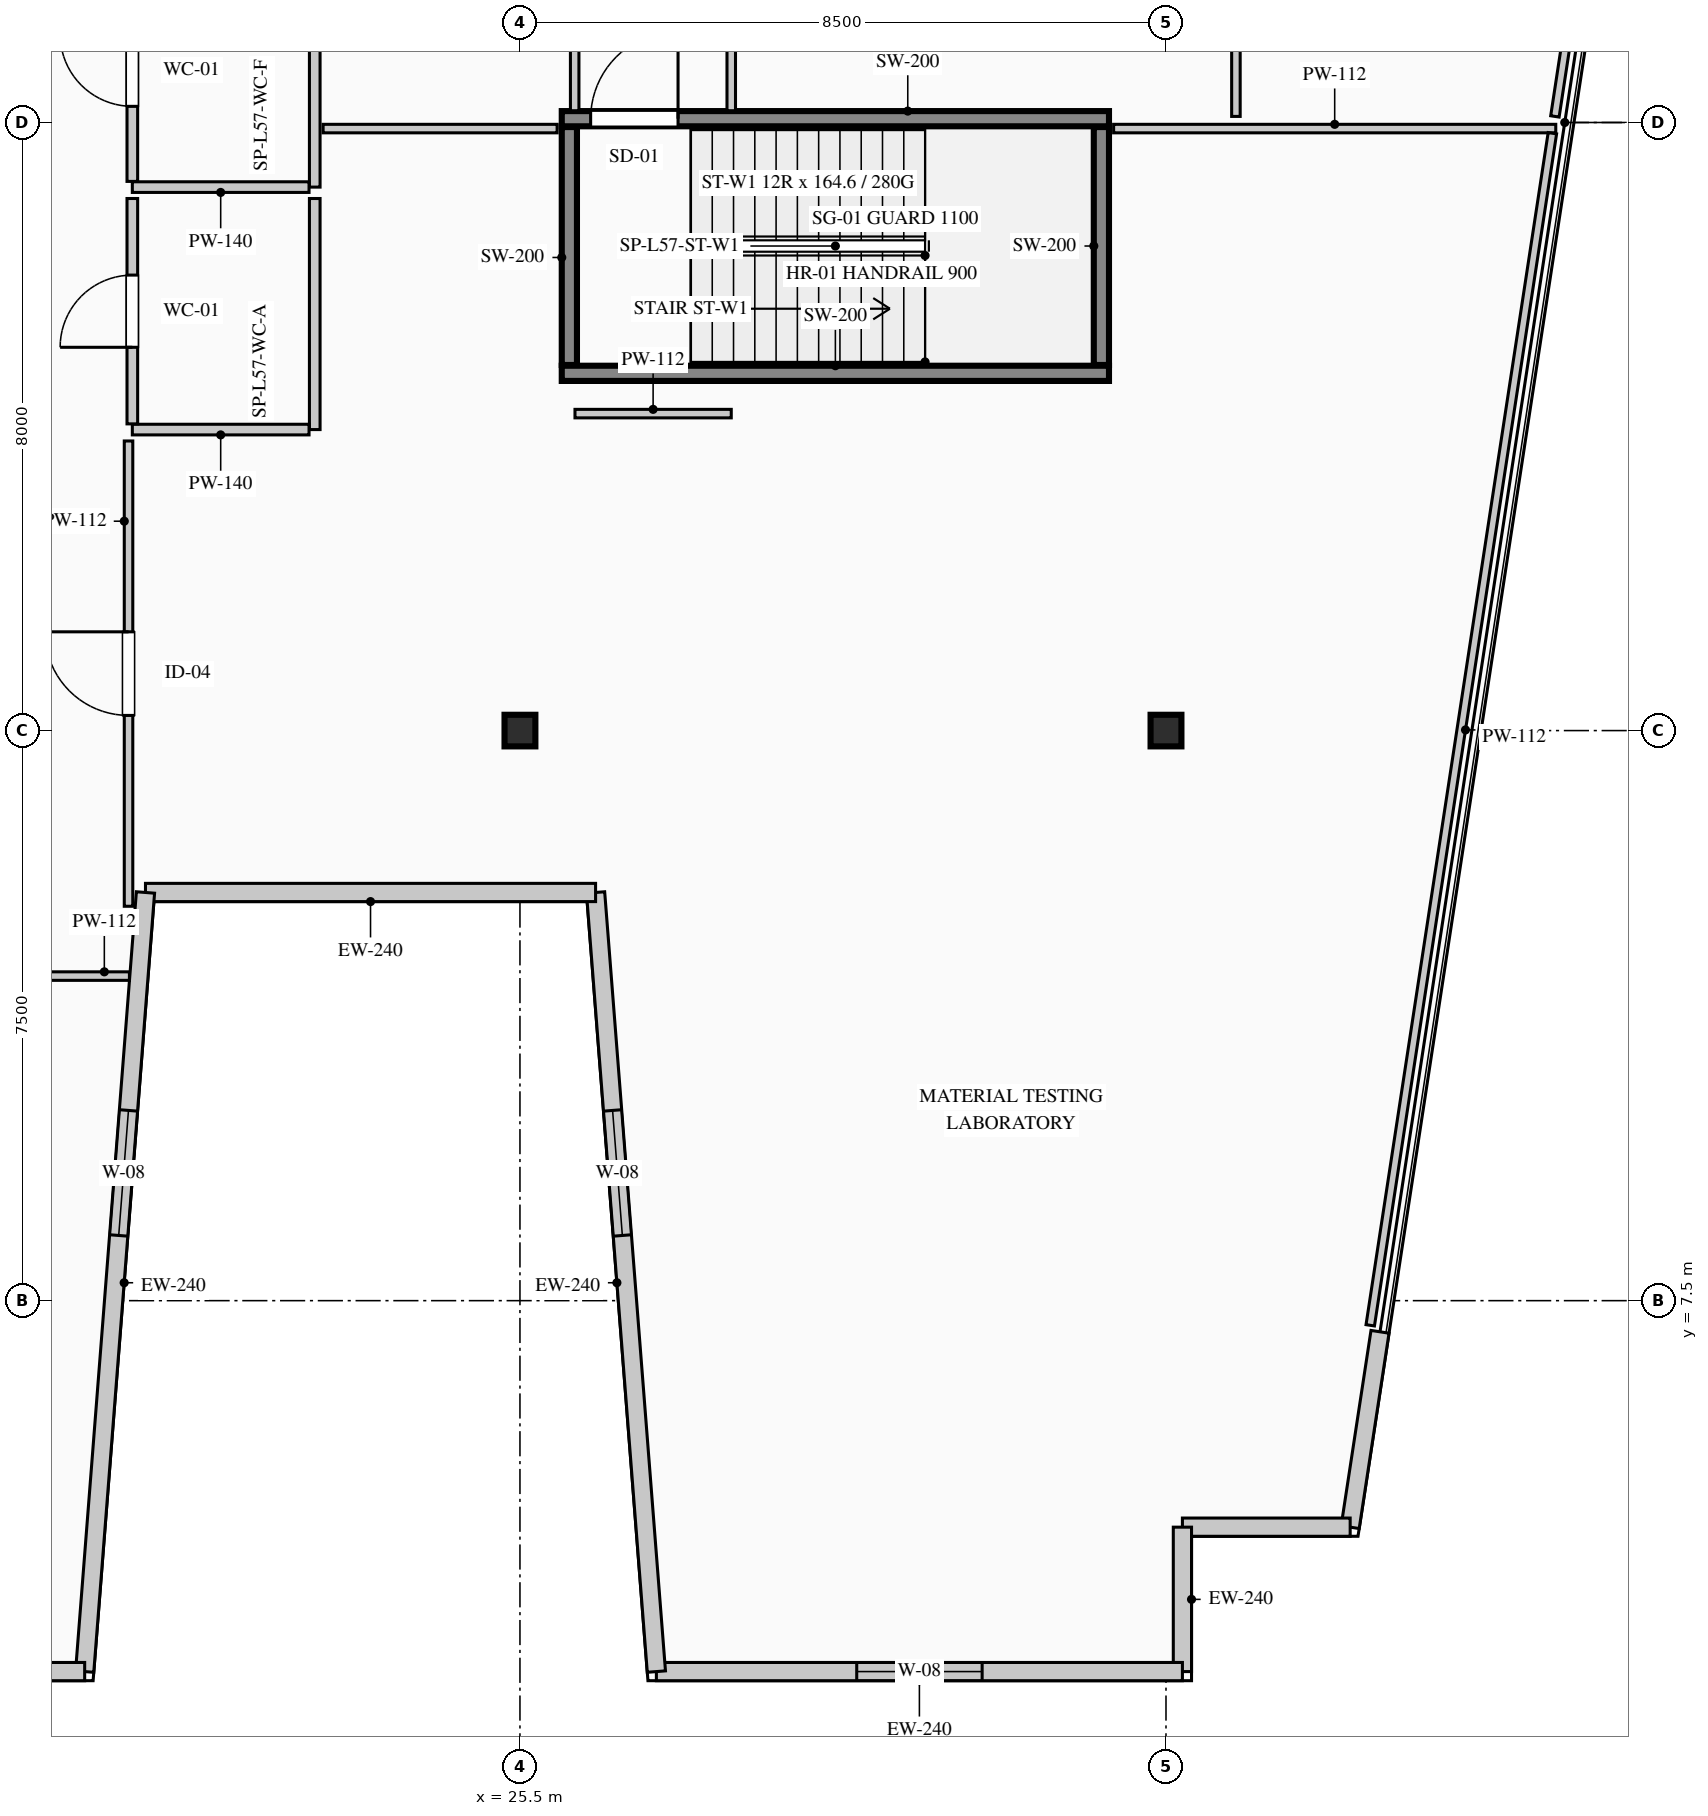
"""IFC4 building model, lengths in metres.
Left out: names, types, materials, properties, quantities, classifications, styles, units other than length and angle.
Written with IfcOpenShell. Run it as: python <this file> out.ifc"""

import sys

from ifc_helpers import new_model, si_unit, direction, frame, frame_2d, origin, origin_2d, place, context, subcontext, project, spatial, rectangle, i_section, extrude, element, fill, save


model = new_model("IFC4")
c1 = context("Model", 3, precision=1e-05, world=origin(), true_north=direction((0.0, 1.0)))
c2 = subcontext(c1, "Body", "Model", "MODEL_VIEW")
j1 = project(units=[si_unit("LENGTHUNIT", "METRE"), si_unit("PLANEANGLEUNIT", "RADIAN")], contexts=[c1])
p1 = place(None, origin())
s1 = spatial("IfcSite", under=j1, at=p1, CompositionType="ELEMENT")
p2 = place(p1, origin())
s2 = spatial("IfcBuilding", under=s1, at=p2, CompositionType="ELEMENT")
p3 = place(p2, frame((0.0, 0.0, 239.05)))
s3 = spatial("IfcBuildingStorey", under=s2, at=p3, CompositionType="ELEMENT", Elevation=239.05)
p4 = place(p3, frame((26.05, 19.7, 0.0), z_axis=(0.0, 0.0, 1.0), x_axis=(1.0, 0.0, 0.0)))
e1 = element("IfcWall", 1, at=p4, inside=s3, PredefinedType="SHEAR", context=c2, shape_type="SweptSolid", body=[
    extrude(rectangle(XDim=7.2, YDim=0.2, at=frame_2d((3.6, 0.0))), origin(), (0.0, 0.0, 1.0), 3.95),
])
p5 = place(p3, frame((26.05, 23.05, 0.0), z_axis=(0.0, 0.0, 1.0), x_axis=(1.0, 0.0, 0.0)))
e2 = element("IfcWall", 2, at=p5, inside=s3, PredefinedType="SHEAR", context=c2, shape_type="SweptSolid", body=[
    extrude(rectangle(XDim=7.2, YDim=0.2, at=frame_2d((3.6, 0.0))), origin(), (0.0, 0.0, 1.0), 3.95),
])
p6 = place(p5, frame((0.38, 0.0, 0.0)))
e3 = element("IfcOpeningElement", 3, at=p6, cuts=e2, PredefinedType="OPENING", context=c2, shape_type="SweptSolid", body=[
    extrude(rectangle(XDim=1.15, YDim=2.2, at=frame_2d((0.575, 1.1))), frame((0.0, 0.11, 0.0), z_axis=(0.0, -1.0, 0.0), x_axis=(1.0, 0.0, 0.0)), (0.0, 0.0, 1.0), 0.22),
])
for number, where, z_axis, x_axis in (
    (4, (26.15, 19.81, 0.0), (0.0, 0.0, 1.0), (0.0, 1.0, 0.0)),
    (5, (33.15, 19.81, 0.0), (0.0, 0.0, 1.0), (0.0, 1.0, 0.0)),
):
    element("IfcWall", number, at=place(p3, frame(where, z_axis=z_axis, x_axis=x_axis)), inside=s3, PredefinedType="SHEAR", context=c2, shape_type="SweptSolid", body=[
        extrude(rectangle(XDim=3.13, YDim=0.2, at=frame_2d((1.565, 0.0))), origin(), (0.0, 0.0, 1.0), 3.95),
    ])
for number, where, z_axis, x_axis in (
    (6, (25.5, 15.0, 0.0), (0.0, 0.0, 1.0), (1.0, 0.0, 0.0)),
    (7, (34.0, 15.0, 0.0), (0.0, 0.0, 1.0), (1.0, 0.0, 0.0)),
):
    element("IfcColumn", number, at=place(p3, frame(where, z_axis=z_axis, x_axis=x_axis)), inside=s3, PredefinedType="COLUMN", context=c2, shape_type="SweptSolid", body=[
        extrude(i_section(OverallWidth=0.406, OverallDepth=0.416, WebThickness=0.03, FlangeThickness=0.048, FilletRadius=0.015, at=origin_2d()), origin(), (0.0, 0.0, 1.0), 3.95),
    ])
p7 = place(p3, frame((36.816, 7.09, 0.0), z_axis=(0.0, 0.0, 1.0), x_axis=(-0.151090396132, -0.988519950328, 0.0)))
e8 = element("IfcWall", 8, at=p7, inside=s3, PredefinedType="STANDARD", context=c2, shape_type="SweptSolid", body=[
    extrude(rectangle(XDim=2.6, YDim=0.24, at=frame_2d((1.3, 0.0))), origin(), (0.0, 0.0, 1.0), 3.7),
])
p8 = place(p3, frame((36.423, 4.52, 0.0), z_axis=(0.0, 0.0, 1.0), x_axis=(-1.0, 0.0, 0.0)))
e9 = element("IfcWall", 9, at=p8, inside=s3, PredefinedType="STANDARD", context=c2, shape_type="SweptSolid", body=[
    extrude(rectangle(XDim=2.207, YDim=0.24, at=frame_2d((1.104, 0.0))), origin(), (0.0, 0.0, 1.0), 3.7),
])
p9 = place(p3, frame((34.216, 4.52, 0.0), z_axis=(0.0, 0.0, 1.0), x_axis=(0.0, -1.0, 0.0)))
e10 = element("IfcWall", 10, at=p9, inside=s3, PredefinedType="STANDARD", context=c2, shape_type="SweptSolid", body=[
    extrude(rectangle(XDim=1.9, YDim=0.24, at=frame_2d((0.95, 0.0))), origin(), (0.0, 0.0, 1.0), 3.7),
])
p10 = place(p3, frame((34.216, 2.62, 0.0), z_axis=(0.0, 0.0, 1.0), x_axis=(-1.0, 0.0, 0.0)))
e11 = element("IfcWall", 11, at=p10, inside=s3, PredefinedType="STANDARD", context=c2, shape_type="SweptSolid", body=[
    extrude(rectangle(XDim=6.921, YDim=0.24, at=frame_2d((3.46, 0.0))), origin(), (0.0, 0.0, 1.0), 3.7),
])
p11 = place(p10, frame((2.635, 0.0, 0.9)))
e12 = element("IfcOpeningElement", 12, at=p11, cuts=e11, PredefinedType="OPENING", context=c2, shape_type="SweptSolid", body=[
    extrude(rectangle(XDim=1.65, YDim=1.95, at=frame_2d((0.825, 0.975))), frame((0.0, 0.13, 0.0), z_axis=(0.0, -1.0, 0.0), x_axis=(1.0, 0.0, 0.0)), (0.0, 0.0, 1.0), 0.26),
])
p12 = place(p3, frame((27.295, 2.62, 0.0), z_axis=(0.0, 0.0, 1.0), x_axis=(-0.077793257511, 0.996969512616, 0.0)))
e13 = element("IfcWall", 13, at=p12, inside=s3, PredefinedType="STANDARD", context=c2, shape_type="SweptSolid", body=[
    extrude(rectangle(XDim=10.281, YDim=0.24, at=frame_2d((5.141, 0.0))), origin(), (0.0, 0.0, 1.0), 3.7),
])
p13 = place(p12, frame((5.755, 0.0, 0.9)))
e14 = element("IfcOpeningElement", 14, at=p13, cuts=e13, PredefinedType="OPENING", context=c2, shape_type="SweptSolid", body=[
    extrude(rectangle(XDim=1.65, YDim=1.95, at=frame_2d((0.825, 0.975))), frame((0.0, 0.13, 0.0), z_axis=(0.0, -1.0, 0.0), x_axis=(1.0, 0.0, 0.0)), (0.0, 0.0, 1.0), 0.26),
])
p14 = place(p3, frame((26.495, 12.87, 0.0), z_axis=(0.0, 0.0, 1.0), x_axis=(-1.0, 0.0, 0.0)))
e15 = element("IfcWall", 15, at=p14, inside=s3, PredefinedType="STANDARD", context=c2, shape_type="SweptSolid", body=[
    extrude(rectangle(XDim=5.922, YDim=0.24, at=frame_2d((2.961, 0.0))), origin(), (0.0, 0.0, 1.0), 3.7),
])
p15 = place(p3, frame((20.573, 12.87, 0.0), z_axis=(0.0, 0.0, 1.0), x_axis=(-0.077816860153, -0.996967670627, 0.0)))
e16 = element("IfcWall", 16, at=p15, inside=s3, PredefinedType="STANDARD", context=c2, shape_type="SweptSolid", body=[
    extrude(rectangle(XDim=10.281, YDim=0.24, at=frame_2d((5.141, 0.0))), origin(), (0.0, 0.0, 1.0), 3.7),
])
p16 = place(p15, frame((2.876, 0.0, 0.9)))
e17 = element("IfcOpeningElement", 17, at=p16, cuts=e16, PredefinedType="OPENING", context=c2, shape_type="SweptSolid", body=[
    extrude(rectangle(XDim=1.65, YDim=1.95, at=frame_2d((0.825, 0.975))), frame((0.0, 0.13, 0.0), z_axis=(0.0, -1.0, 0.0), x_axis=(1.0, 0.0, 0.0)), (0.0, 0.0, 1.0), 0.26),
])
p17 = place(p3, frame((19.773, 2.62, 0.0), z_axis=(0.0, 0.0, 1.0), x_axis=(-1.0, 0.0, 0.0)))
e18 = element("IfcWall", 18, at=p17, inside=s3, PredefinedType="STANDARD", context=c2, shape_type="SweptSolid", body=[
    extrude(rectangle(XDim=10.717, YDim=0.24, at=frame_2d((5.358, 0.0))), origin(), (0.0, 0.0, 1.0), 3.7),
])
p18 = place(p17, frame((4.659, 0.0, 0.0)))
e19 = element("IfcOpeningElement", 19, at=p18, cuts=e18, PredefinedType="OPENING", context=c2, shape_type="SweptSolid", body=[
    extrude(rectangle(XDim=1.4, YDim=2.2, at=frame_2d((0.7, 1.1))), frame((0.0, 0.13, 0.0), z_axis=(0.0, -1.0, 0.0), x_axis=(1.0, 0.0, 0.0)), (0.0, 0.0, 1.0), 0.26),
])
p19 = place(p3, frame((22.8, 25.15, 0.0), z_axis=(0.0, 0.0, 1.0), x_axis=(0.0, -1.0, 0.0)))
e20 = element("IfcWall", 20, at=p19, inside=s3, PredefinedType="PARTITIONING", context=c2, shape_type="SweptSolid", body=[
    extrude(rectangle(XDim=3.0, YDim=0.14, at=frame_2d((1.5, 0.0))), origin(), (0.0, 0.0, 1.0), 3.325),
])
p20 = place(p3, frame((22.725, 22.15, 0.0), z_axis=(0.0, 0.0, 1.0), x_axis=(-1.0, 0.0, 0.0)))
e21 = element("IfcWall", 21, at=p20, inside=s3, PredefinedType="PARTITIONING", context=c2, shape_type="SweptSolid", body=[
    extrude(rectangle(XDim=2.325, YDim=0.14, at=frame_2d((1.163, 0.0))), origin(), (0.0, 0.0, 1.0), 3.7),
])
p21 = place(p3, frame((20.4, 22.225, 0.0), z_axis=(0.0, 0.0, 1.0), x_axis=(0.0, 1.0, 0.0)))
e22 = element("IfcWall", 22, at=p21, inside=s3, PredefinedType="PARTITIONING", context=c2, shape_type="SweptSolid", body=[
    extrude(rectangle(XDim=2.925, YDim=0.14, at=frame_2d((1.462, 0.0))), origin(), (0.0, 0.0, 1.0), 3.7),
])
p22 = place(p21, frame((0.988, 0.0, 0.0)))
e23 = element("IfcOpeningElement", 23, at=p22, cuts=e22, PredefinedType="OPENING", context=c2, shape_type="SweptSolid", body=[
    extrude(rectangle(XDim=0.95, YDim=2.15, at=frame_2d((0.475, 1.075))), frame((0.0, 0.08, 0.0), z_axis=(0.0, -1.0, 0.0), x_axis=(1.0, 0.0, 0.0)), (0.0, 0.0, 1.0), 0.16),
])
p23 = place(p3, frame((22.8, 22.0, 0.0), z_axis=(0.0, 0.0, 1.0), x_axis=(0.0, -1.0, 0.0)))
e24 = element("IfcWall", 24, at=p23, inside=s3, PredefinedType="PARTITIONING", context=c2, shape_type="SweptSolid", body=[
    extrude(rectangle(XDim=3.04, YDim=0.14, at=frame_2d((1.52, 0.0))), origin(), (0.0, 0.0, 1.0), 3.325),
])
p24 = place(p3, frame((22.725, 18.96, 0.0), z_axis=(0.0, 0.0, 1.0), x_axis=(-1.0, 0.0, 0.0)))
e25 = element("IfcWall", 25, at=p24, inside=s3, PredefinedType="PARTITIONING", context=c2, shape_type="SweptSolid", body=[
    extrude(rectangle(XDim=2.325, YDim=0.14, at=frame_2d((1.163, 0.0))), origin(), (0.0, 0.0, 1.0), 3.7),
])
p25 = place(p3, frame((20.4, 19.035, 0.0), z_axis=(0.0, 0.0, 1.0), x_axis=(0.0, 1.0, 0.0)))
e26 = element("IfcWall", 26, at=p25, inside=s3, PredefinedType="PARTITIONING", context=c2, shape_type="SweptSolid", body=[
    extrude(rectangle(XDim=2.965, YDim=0.14, at=frame_2d((1.482, 0.0))), origin(), (0.0, 0.0, 1.0), 3.7),
])
p26 = place(p25, frame((1.008, 0.0, 0.0)))
e27 = element("IfcOpeningElement", 27, at=p26, cuts=e26, PredefinedType="OPENING", context=c2, shape_type="SweptSolid", body=[
    extrude(rectangle(XDim=0.95, YDim=2.15, at=frame_2d((0.475, 1.075))), frame((0.0, 0.08, 0.0), z_axis=(0.0, -1.0, 0.0), x_axis=(1.0, 0.0, 0.0)), (0.0, 0.0, 1.0), 0.16),
])
p27 = place(p3, frame((17.141, 11.77, 0.0), z_axis=(0.0, 0.0, 1.0), x_axis=(1.0, 0.0, 0.0)))
e28 = element("IfcWall", 28, at=p27, inside=s3, PredefinedType="PARTITIONING", context=c2, shape_type="SweptSolid", body=[
    extrude(rectangle(XDim=3.221, YDim=0.112, at=frame_2d((1.61, 0.0))), origin(), (0.0, 0.0, 1.0), 3.7),
])
p28 = place(p27, frame((1.06, 0.0, 0.0)))
e29 = element("IfcOpeningElement", 29, at=p28, cuts=e28, PredefinedType="OPENING", context=c2, shape_type="SweptSolid", body=[
    extrude(rectangle(XDim=1.1, YDim=2.2, at=frame_2d((0.55, 1.1))), frame((0.0, 0.066, 0.0), z_axis=(0.0, -1.0, 0.0), x_axis=(1.0, 0.0, 0.0)), (0.0, 0.0, 1.0), 0.132),
])
p29 = place(p3, frame((33.311, 22.92, 0.0), z_axis=(0.0, 0.0, 1.0), x_axis=(1.0, 0.0, 0.0)))
e30 = element("IfcWall", 30, at=p29, inside=s3, PredefinedType="PARTITIONING", context=c2, shape_type="SweptSolid", body=[
    extrude(rectangle(XDim=5.817, YDim=0.112, at=frame_2d((2.909, 0.0))), origin(), (0.0, 0.0, 1.0), 3.7),
])
p30 = place(p3, frame((39.084, 22.859, 0.0), z_axis=(0.0, 0.0, 1.0), x_axis=(-0.151051087355, -0.988525957681, 0.0)))
e31 = element("IfcWall", 31, at=p30, inside=s3, PredefinedType="PARTITIONING", context=c2, shape_type="SweptSolid", body=[
    extrude(rectangle(XDim=15.865, YDim=0.112, at=frame_2d((7.933, 0.0))), origin(), (0.0, 0.0, 1.0), 3.7),
])
p31 = place(p3, frame((20.35, 12.689, 0.0), z_axis=(0.0, 0.0, 1.0), x_axis=(0.0, 1.0, 0.0)))
e32 = element("IfcWall", 32, at=p31, inside=s3, PredefinedType="PARTITIONING", context=c2, shape_type="SweptSolid", body=[
    extrude(rectangle(XDim=6.121, YDim=0.112, at=frame_2d((3.061, 0.0))), origin(), (0.0, 0.0, 1.0), 3.7),
])
p32 = place(p31, frame((2.511, 0.0, 0.0)))
e33 = element("IfcOpeningElement", 33, at=p32, cuts=e32, PredefinedType="OPENING", context=c2, shape_type="SweptSolid", body=[
    extrude(rectangle(XDim=1.1, YDim=2.2, at=frame_2d((0.55, 1.1))), frame((0.0, 0.066, 0.0), z_axis=(0.0, -1.0, 0.0), x_axis=(1.0, 0.0, 0.0)), (0.0, 0.0, 1.0), 0.132),
])
p33 = place(p3, frame((22.91, 22.92, 0.0), z_axis=(0.0, 0.0, 1.0), x_axis=(1.0, 0.0, 0.0)))
e34 = element("IfcWall", 34, at=p33, inside=s3, PredefinedType="PARTITIONING", context=c2, shape_type="SweptSolid", body=[
    extrude(rectangle(XDim=3.079, YDim=0.112, at=frame_2d((1.54, 0.0))), origin(), (0.0, 0.0, 1.0), 3.7),
])
p34 = place(p3, frame((26.224, 19.17, 0.0), z_axis=(0.0, 0.0, 1.0), x_axis=(1.0, 0.0, 0.0)))
e35 = element("IfcWall", 35, at=p34, inside=s3, PredefinedType="PARTITIONING", context=c2, shape_type="SweptSolid", body=[
    extrude(rectangle(XDim=2.056, YDim=0.112, at=frame_2d((1.028, 0.0))), origin(), (0.0, 0.0, 1.0), 3.7),
])
p35 = place(p3, frame((26.22, 28.959, 0.0), z_axis=(0.0, 0.0, 1.0), x_axis=(0.0, -1.0, 0.0)))
e36 = element("IfcWall", 36, at=p35, inside=s3, PredefinedType="PARTITIONING", context=c2, shape_type="SweptSolid", body=[
    extrude(rectangle(XDim=5.804, YDim=0.112, at=frame_2d((2.902, 0.0))), origin(), (0.0, 0.0, 1.0), 3.7),
])
p36 = place(p35, frame((2.352, 0.0, 0.0)))
e37 = element("IfcOpeningElement", 37, at=p36, cuts=e36, PredefinedType="OPENING", context=c2, shape_type="SweptSolid", body=[
    extrude(rectangle(XDim=1.1, YDim=2.2, at=frame_2d((0.55, 1.1))), frame((0.0, 0.066, 0.0), z_axis=(0.0, -1.0, 0.0), x_axis=(1.0, 0.0, 0.0)), (0.0, 0.0, 1.0), 0.132),
])
p37 = place(p3, frame((28.28, 23.155, 0.0), z_axis=(0.0, 0.0, 1.0), x_axis=(0.0, 1.0, 0.0)))
e38 = element("IfcWall", 38, at=p37, inside=s3, PredefinedType="PARTITIONING", context=c2, shape_type="SweptSolid", body=[
    extrude(rectangle(XDim=5.865, YDim=0.112, at=frame_2d((2.933, 0.0))), origin(), (0.0, 0.0, 1.0), 3.7),
])
p38 = place(p3, frame((34.92, 28.959, 0.0), z_axis=(0.0, 0.0, 1.0), x_axis=(0.0, -1.0, 0.0)))
e39 = element("IfcWall", 39, at=p38, inside=s3, PredefinedType="PARTITIONING", context=c2, shape_type="SweptSolid", body=[
    extrude(rectangle(XDim=5.879, YDim=0.112, at=frame_2d((2.939, 0.0))), origin(), (0.0, 0.0, 1.0), 3.7),
])
p39 = place(p3, frame((41.529, 38.867, 0.0), z_axis=(0.0, 0.0, 1.0), x_axis=(-0.151041582551, -0.98852741001, 0.0)))
e40 = element("IfcWall", 40, at=p39, inside=s3, PredefinedType="PARTITIONING", context=c2, shape_type="SweptSolid", body=[
    extrude(rectangle(XDim=15.97, YDim=0.112, at=frame_2d((7.985, 0.0))), origin(), (0.0, 0.0, 1.0), 3.7),
])
p40 = place(p11, origin())
e41 = element("IfcWindow", 41, at=p40, inside=s3, PartitioningType="SINGLE_PANEL", PredefinedType="WINDOW", context=c2, shape_type="SweptSolid", body=[
    extrude(rectangle(XDim=1.65, YDim=1.95, at=frame_2d((0.825, 0.975))), frame((0.0, 0.03, 0.0), z_axis=(0.0, -1.0, 0.0), x_axis=(1.0, 0.0, 0.0)), (0.0, 0.0, 1.0), 0.06),
])
fill(e12, e41)
p41 = place(p13, origin())
e42 = element("IfcWindow", 42, at=p41, inside=s3, PartitioningType="SINGLE_PANEL", PredefinedType="WINDOW", context=c2, shape_type="SweptSolid", body=[
    extrude(rectangle(XDim=1.65, YDim=1.95, at=frame_2d((0.825, 0.975))), frame((0.0, 0.03, 0.0), z_axis=(0.0, -1.0, 0.0), x_axis=(1.0, 0.0, 0.0)), (0.0, 0.0, 1.0), 0.06),
])
fill(e14, e42)
p42 = place(p16, origin())
e43 = element("IfcWindow", 43, at=p42, inside=s3, PartitioningType="SINGLE_PANEL", PredefinedType="WINDOW", context=c2, shape_type="SweptSolid", body=[
    extrude(rectangle(XDim=1.65, YDim=1.95, at=frame_2d((0.825, 0.975))), frame((0.0, 0.03, 0.0), z_axis=(0.0, -1.0, 0.0), x_axis=(1.0, 0.0, 0.0)), (0.0, 0.0, 1.0), 0.06),
])
fill(e17, e43)
p43 = place(p6, origin())
e44 = element("IfcDoor", 44, at=p43, inside=s3, OperationType="SINGLE_SWING_RIGHT", PredefinedType="DOOR", context=c2, shape_type="SweptSolid", body=[
    extrude(rectangle(XDim=1.15, YDim=2.2, at=frame_2d((0.575, 1.1))), frame((0.0, 0.025, 0.0), z_axis=(0.0, -1.0, 0.0), x_axis=(1.0, 0.0, 0.0)), (0.0, 0.0, 1.0), 0.05),
])
fill(e3, e44)
p44 = place(p22, origin())
e45 = element("IfcDoor", 45, at=p44, inside=s3, OperationType="SINGLE_SWING_RIGHT", PredefinedType="DOOR", context=c2, shape_type="SweptSolid", body=[
    extrude(rectangle(XDim=0.95, YDim=2.15, at=frame_2d((0.475, 1.075))), frame((0.0, 0.025, 0.0), z_axis=(0.0, -1.0, 0.0), x_axis=(1.0, 0.0, 0.0)), (0.0, 0.0, 1.0), 0.05),
])
fill(e23, e45)
p45 = place(p26, origin())
e46 = element("IfcDoor", 46, at=p45, inside=s3, OperationType="SINGLE_SWING_LEFT", PredefinedType="DOOR", context=c2, shape_type="SweptSolid", body=[
    extrude(rectangle(XDim=0.95, YDim=2.15, at=frame_2d((0.475, 1.075))), frame((0.0, 0.025, 0.0), z_axis=(0.0, -1.0, 0.0), x_axis=(1.0, 0.0, 0.0)), (0.0, 0.0, 1.0), 0.05),
])
fill(e27, e46)
p46 = place(p32, origin())
e47 = element("IfcDoor", 47, at=p46, inside=s3, OperationType="SINGLE_SWING_RIGHT", PredefinedType="DOOR", context=c2, shape_type="SweptSolid", body=[
    extrude(rectangle(XDim=1.1, YDim=2.2, at=frame_2d((0.55, 1.1))), frame((0.0, 0.025, 0.0), z_axis=(0.0, -1.0, 0.0), x_axis=(1.0, 0.0, 0.0)), (0.0, 0.0, 1.0), 0.05),
])
fill(e33, e47)
save(model, sys.argv[1])
